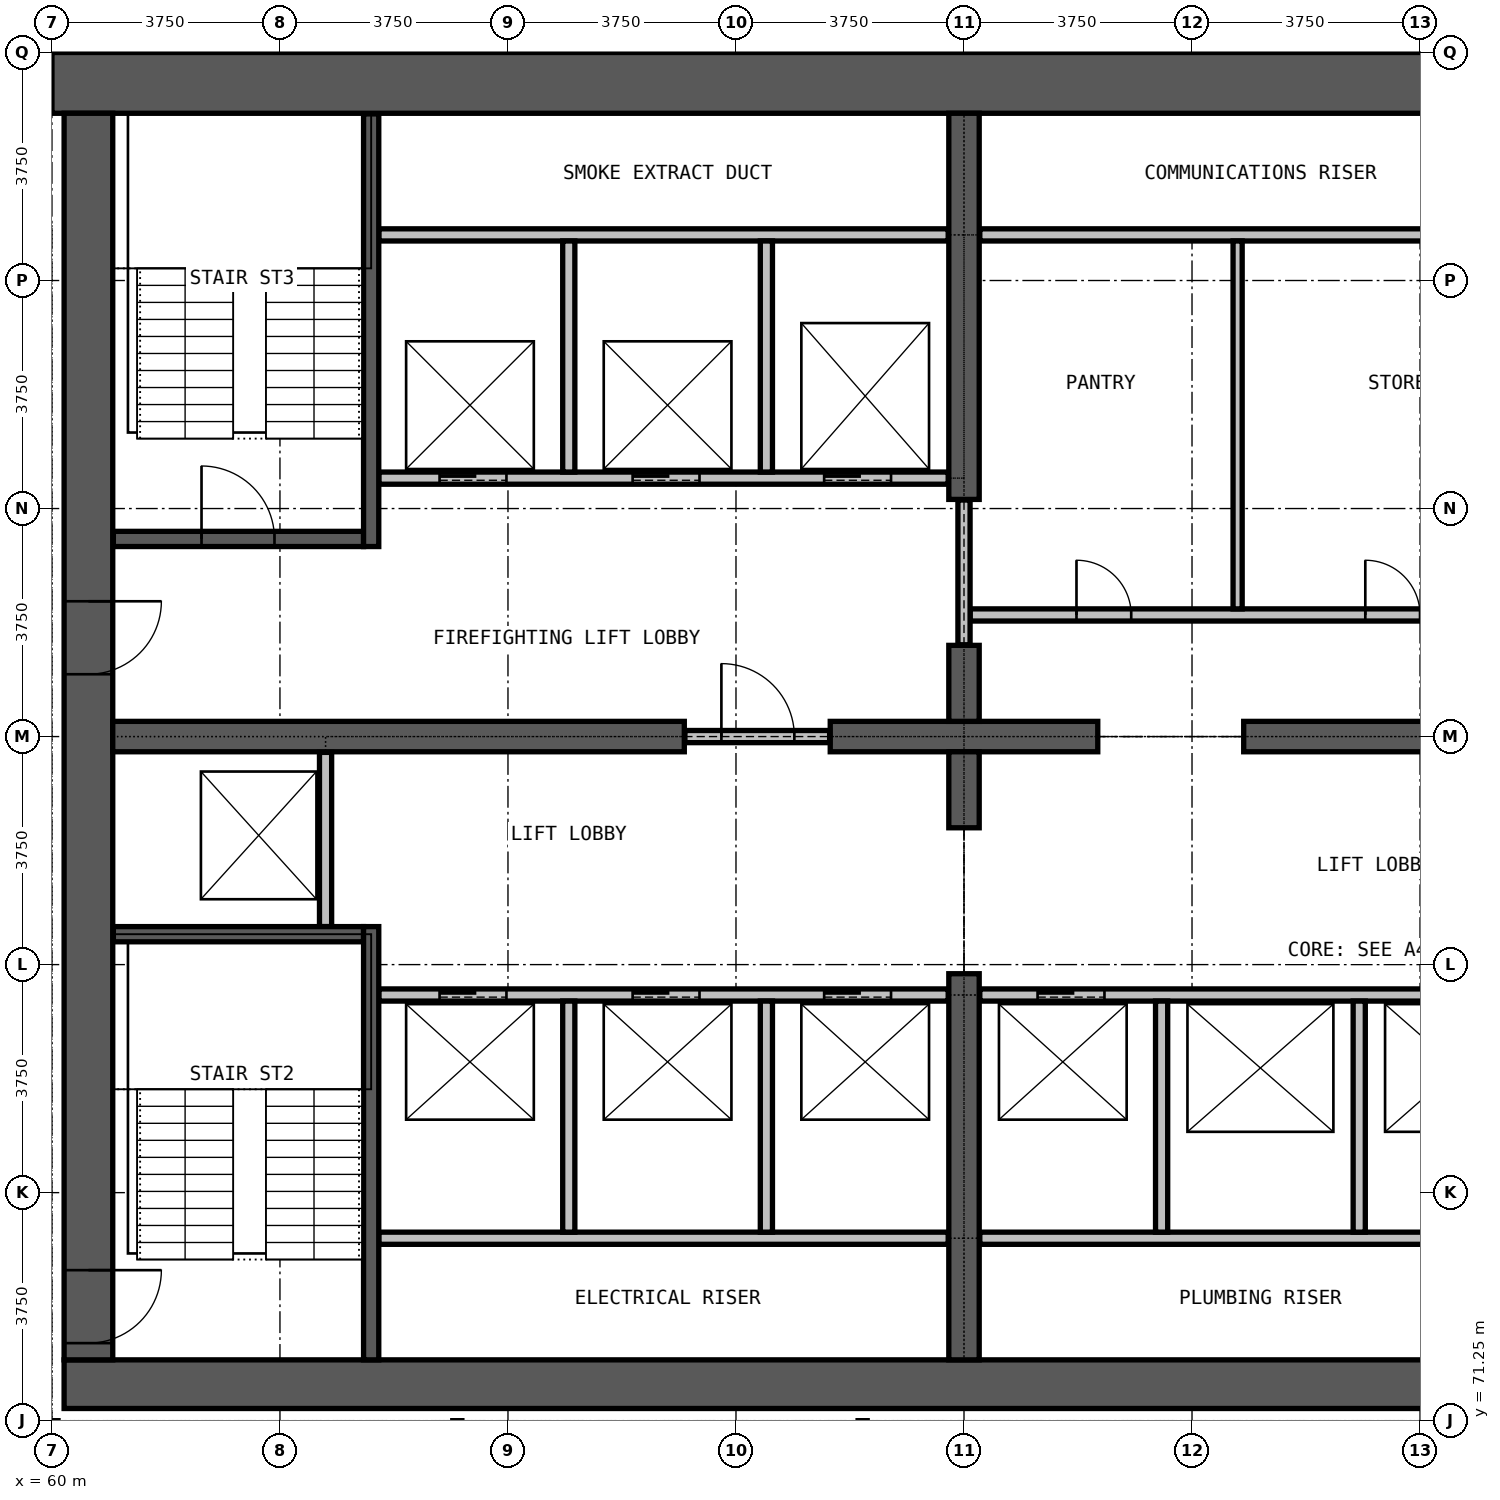
"""IFC4 building model, lengths in metres.
Left out: names, types, materials, properties, quantities, classifications, styles, units other than length and angle.
Written with IfcOpenShell. Run it as: python <this file> out.ifc"""

import sys

from ifc_helpers import new_model, si_unit, direction, frame, frame_2d, origin, place, context, subcontext, project, spatial, rectangle, extrude, element, fill, save


model = new_model("IFC4")
c1 = context("Model", 3, precision=1e-05, world=origin(), true_north=direction((0.0, 1.0)))
c2 = subcontext(c1, "Body", "Model", "MODEL_VIEW")
j1 = project(units=[si_unit("LENGTHUNIT", "METRE"), si_unit("PLANEANGLEUNIT", "RADIAN")], contexts=[c1])
p1 = place(None, origin())
s1 = spatial("IfcSite", under=j1, at=p1, CompositionType="ELEMENT")
p2 = place(p1, origin())
s2 = spatial("IfcBuilding", under=s1, at=p2, CompositionType="ELEMENT")
p3 = place(p2, frame((0.0, 0.0, 121.6)))
s3 = spatial("IfcBuildingStorey", under=s2, at=p3, CompositionType="ELEMENT", Elevation=121.6)
p4 = place(p3, frame((60.2, 71.85, 0.0), z_axis=(0.0, 0.0, 1.0), x_axis=(1.0, 0.0, 0.0)))
e1 = element("IfcWall", 1, at=p4, inside=s3, PredefinedType="SHEAR", context=c2, shape_type="SweptSolid", body=[
    extrude(rectangle(XDim=29.6, YDim=0.8, at=frame_2d((14.8, 0.0))), origin(), (0.0, 0.0, 1.0), 3.6),
])
p5 = place(p3, frame((90.0, 93.25, 0.0), z_axis=(0.0, 0.0, 1.0), x_axis=(-1.0, 0.0, 0.0)))
e2 = element("IfcWall", 2, at=p5, inside=s3, PredefinedType="SHEAR", context=c2, shape_type="SweptSolid", body=[
    extrude(rectangle(XDim=30.0, YDim=1.0, at=frame_2d((15.0, 0.0))), origin(), (0.0, 0.0, 1.0), 3.6),
])
p6 = place(p3, frame((60.6, 92.75, 0.0), z_axis=(0.0, 0.0, 1.0), x_axis=(0.0, -1.0, 0.0)))
e3 = element("IfcWall", 3, at=p6, inside=s3, PredefinedType="SHEAR", context=c2, shape_type="SweptSolid", body=[
    extrude(rectangle(XDim=20.5, YDim=0.8, at=frame_2d((10.25, 0.0))), origin(), (0.0, 0.0, 1.0), 3.6),
])
p7 = place(p6, frame((19.025, 0.0, 0.0)))
e4 = element("IfcOpeningElement", 4, at=p7, cuts=e3, PredefinedType="OPENING", context=c2, shape_type="SweptSolid", body=[
    extrude(rectangle(XDim=1.2, YDim=2.2, at=frame_2d((0.6, 1.1))), frame((0.0, 0.41, 0.0), z_axis=(0.0, -1.0, 0.0), x_axis=(1.0, 0.0, 0.0)), (0.0, 0.0, 1.0), 0.82),
])
p8 = place(p6, frame((8.025, 0.0, 0.0)))
e5 = element("IfcOpeningElement", 5, at=p8, cuts=e3, PredefinedType="OPENING", context=c2, shape_type="SweptSolid", body=[
    extrude(rectangle(XDim=1.2, YDim=2.2, at=frame_2d((0.6, 1.1))), frame((0.0, 0.41, 0.0), z_axis=(0.0, -1.0, 0.0), x_axis=(1.0, 0.0, 0.0)), (0.0, 0.0, 1.0), 0.82),
])
p9 = place(p3, frame((61.0, 82.5, 0.0), z_axis=(0.0, 0.0, 1.0), x_axis=(1.0, 0.0, 0.0)))
e6 = element("IfcWall", 6, at=p9, inside=s3, PredefinedType="SHEAR", context=c2, shape_type="SweptSolid", body=[
    extrude(rectangle(XDim=9.4, YDim=0.5, at=frame_2d((4.7, 0.0))), origin(), (0.0, 0.0, 1.0), 3.6),
])
p10 = place(p3, frame((72.8, 82.5, 0.0), z_axis=(0.0, 0.0, 1.0), x_axis=(1.0, 0.0, 0.0)))
e7 = element("IfcWall", 7, at=p10, inside=s3, PredefinedType="SHEAR", context=c2, shape_type="SweptSolid", body=[
    extrude(rectangle(XDim=4.4, YDim=0.5, at=frame_2d((2.2, 0.0))), origin(), (0.0, 0.0, 1.0), 3.6),
])
p11 = place(p3, frame((79.6, 82.5, 0.0), z_axis=(0.0, 0.0, 1.0), x_axis=(1.0, 0.0, 0.0)))
e8 = element("IfcWall", 8, at=p11, inside=s3, PredefinedType="SHEAR", context=c2, shape_type="SweptSolid", body=[
    extrude(rectangle(XDim=9.4, YDim=0.5, at=frame_2d((4.7, 0.0))), origin(), (0.0, 0.0, 1.0), 3.6),
])
p12 = place(p3, frame((75.0, 72.25, 0.0), z_axis=(0.0, 0.0, 1.0), x_axis=(0.0, 1.0, 0.0)))
e9 = element("IfcWall", 9, at=p12, inside=s3, PredefinedType="SHEAR", context=c2, shape_type="SweptSolid", body=[
    extrude(rectangle(XDim=6.35, YDim=0.5, at=frame_2d((3.175, 0.0))), origin(), (0.0, 0.0, 1.0), 3.6),
])
for number, where, z_axis, x_axis in (
    (10, (75.0, 81.0, 0.0), (0.0, 0.0, 1.0), (0.0, 1.0, 0.0)),
    (11, (75.0, 82.75, 0.0), (0.0, 0.0, 1.0), (0.0, 1.0, 0.0)),
):
    element("IfcWall", number, at=place(p3, frame(where, z_axis=z_axis, x_axis=x_axis)), inside=s3, PredefinedType="SHEAR", context=c2, shape_type="SweptSolid", body=[
        extrude(rectangle(XDim=1.25, YDim=0.5, at=frame_2d((0.625, 0.0))), origin(), (0.0, 0.0, 1.0), 3.6),
    ])
p13 = place(p3, frame((75.0, 86.4, 0.0), z_axis=(0.0, 0.0, 1.0), x_axis=(0.0, 1.0, 0.0)))
e12 = element("IfcWall", 12, at=p13, inside=s3, PredefinedType="SHEAR", context=c2, shape_type="SweptSolid", body=[
    extrude(rectangle(XDim=6.35, YDim=0.5, at=frame_2d((3.175, 0.0))), origin(), (0.0, 0.0, 1.0), 3.6),
])
p14 = place(p3, frame((70.41, 82.5, 0.0), z_axis=(0.0, 0.0, 1.0), x_axis=(1.0, 0.0, 0.0)))
e13 = element("IfcWall", 13, at=p14, inside=s3, PredefinedType="PARTITIONING", context=c2, shape_type="SweptSolid", body=[
    extrude(rectangle(XDim=2.38, YDim=0.2, at=frame_2d((1.19, 0.0))), origin(), (0.0, 0.0, 1.0), 2.4),
])
p15 = place(p14, frame((0.6, 0.0, 0.0)))
e14 = element("IfcOpeningElement", 14, at=p15, cuts=e13, PredefinedType="OPENING", context=c2, shape_type="SweptSolid", body=[
    extrude(rectangle(XDim=1.2, YDim=2.2, at=frame_2d((0.6, 1.1))), frame((0.0, 0.11, 0.0), z_axis=(0.0, -1.0, 0.0), x_axis=(1.0, 0.0, 0.0)), (0.0, 0.0, 1.0), 0.22),
])
p16 = place(p3, frame((75.1, 84.5, 0.0), z_axis=(0.0, 0.0, 1.0), x_axis=(1.0, 0.0, 0.0)))
e15 = element("IfcWall", 15, at=p16, inside=s3, PredefinedType="PARTITIONING", context=c2, shape_type="SweptSolid", body=[
    extrude(rectangle(XDim=9.55, YDim=0.2, at=frame_2d((4.775, 0.0))), origin(), (0.0, 0.0, 1.0), 3.3),
])
p17 = place(p16, frame((1.75, 0.0, 0.0)))
e16 = element("IfcOpeningElement", 16, at=p17, cuts=e15, PredefinedType="OPENING", context=c2, shape_type="SweptSolid", body=[
    extrude(rectangle(XDim=0.9, YDim=2.2, at=frame_2d((0.45, 1.1))), frame((0.0, 0.11, 0.0), z_axis=(0.0, -1.0, 0.0), x_axis=(1.0, 0.0, 0.0)), (0.0, 0.0, 1.0), 0.22),
])
p18 = place(p16, frame((6.5, 0.0, 0.0)))
e17 = element("IfcOpeningElement", 17, at=p18, cuts=e15, PredefinedType="OPENING", context=c2, shape_type="SweptSolid", body=[
    extrude(rectangle(XDim=0.9, YDim=2.2, at=frame_2d((0.45, 1.1))), frame((0.0, 0.11, 0.0), z_axis=(0.0, -1.0, 0.0), x_axis=(1.0, 0.0, 0.0)), (0.0, 0.0, 1.0), 0.22),
])
p19 = place(p3, frame((75.26, 90.75, 0.0), z_axis=(0.0, 0.0, 1.0), x_axis=(1.0, 0.0, 0.0)))
e18 = element("IfcWall", 18, at=p19, inside=s3, PredefinedType="PARTITIONING", context=c2, shape_type="SweptSolid", body=[
    extrude(rectangle(XDim=9.365, YDim=0.2, at=frame_2d((4.683, 0.0))), origin(), (0.0, 0.0, 1.0), 3.3),
])
p20 = place(p3, frame((75.0, 84.01, 0.0), z_axis=(0.0, 0.0, 1.0), x_axis=(0.0, 1.0, 0.0)))
e19 = element("IfcWall", 19, at=p20, inside=s3, PredefinedType="PARTITIONING", context=c2, shape_type="SweptSolid", body=[
    extrude(rectangle(XDim=2.38, YDim=0.2, at=frame_2d((1.19, 0.0))), origin(), (0.0, 0.0, 1.0), 2.4),
])
p21 = place(p3, frame((79.5, 84.6, 0.0), z_axis=(0.0, 0.0, 1.0), x_axis=(0.0, 1.0, 0.0)))
e20 = element("IfcWall", 20, at=p21, inside=s3, PredefinedType="PARTITIONING", context=c2, shape_type="SweptSolid", body=[
    extrude(rectangle(XDim=6.05, YDim=0.15, at=frame_2d((3.025, 0.0))), origin(), (0.0, 0.0, 1.0), 3.3),
])
for number, where, z_axis, x_axis in (
    (21, (65.375, 74.25, 0.0), (0.0, 0.0, 1.0), (1.0, 0.0, 0.0)),
    (22, (75.26, 74.25, 0.0), (0.0, 0.0, 1.0), (1.0, 0.0, 0.0)),
):
    element("IfcWall", number, at=place(p3, frame(where, z_axis=z_axis, x_axis=x_axis)), inside=s3, PredefinedType="PARTITIONING", context=c2, shape_type="SweptSolid", body=[
        extrude(rectangle(XDim=9.365, YDim=0.2, at=frame_2d((4.683, 0.0))), origin(), (0.0, 0.0, 1.0), 3.3),
    ])
p22 = place(p3, frame((65.375, 78.25, 0.0), z_axis=(0.0, 0.0, 1.0), x_axis=(1.0, 0.0, 0.0)))
e23 = element("IfcWall", 23, at=p22, inside=s3, PredefinedType="PARTITIONING", context=c2, shape_type="SweptSolid", body=[
    extrude(rectangle(XDim=9.365, YDim=0.2, at=frame_2d((4.683, 0.0))), origin(), (0.0, 0.0, 1.0), 3.3),
])
p23 = place(p22, frame((1.0, 0.0, 0.0)))
e24 = element("IfcOpeningElement", 24, at=p23, cuts=e23, PredefinedType="OPENING", context=c2, shape_type="SweptSolid", body=[
    extrude(rectangle(XDim=1.1, YDim=2.2, at=frame_2d((0.55, 1.1))), frame((0.0, 0.11, 0.0), z_axis=(0.0, -1.0, 0.0), x_axis=(1.0, 0.0, 0.0)), (0.0, 0.0, 1.0), 0.22),
])
p24 = place(p22, frame((4.175, 0.0, 0.0)))
e25 = element("IfcOpeningElement", 25, at=p24, cuts=e23, PredefinedType="OPENING", context=c2, shape_type="SweptSolid", body=[
    extrude(rectangle(XDim=1.1, YDim=2.2, at=frame_2d((0.55, 1.1))), frame((0.0, 0.11, 0.0), z_axis=(0.0, -1.0, 0.0), x_axis=(1.0, 0.0, 0.0)), (0.0, 0.0, 1.0), 0.22),
])
p25 = place(p22, frame((7.325, 0.0, 0.0)))
e26 = element("IfcOpeningElement", 26, at=p25, cuts=e23, PredefinedType="OPENING", context=c2, shape_type="SweptSolid", body=[
    extrude(rectangle(XDim=1.1, YDim=2.2, at=frame_2d((0.55, 1.1))), frame((0.0, 0.11, 0.0), z_axis=(0.0, -1.0, 0.0), x_axis=(1.0, 0.0, 0.0)), (0.0, 0.0, 1.0), 0.22),
])
p26 = place(p3, frame((75.26, 78.25, 0.0), z_axis=(0.0, 0.0, 1.0), x_axis=(1.0, 0.0, 0.0)))
e27 = element("IfcWall", 27, at=p26, inside=s3, PredefinedType="PARTITIONING", context=c2, shape_type="SweptSolid", body=[
    extrude(rectangle(XDim=9.365, YDim=0.2, at=frame_2d((4.683, 0.0))), origin(), (0.0, 0.0, 1.0), 3.3),
])
p27 = place(p26, frame((0.95, 0.0, 0.0)))
e28 = element("IfcOpeningElement", 28, at=p27, cuts=e27, PredefinedType="OPENING", context=c2, shape_type="SweptSolid", body=[
    extrude(rectangle(XDim=1.1, YDim=2.2, at=frame_2d((0.55, 1.1))), frame((0.0, 0.11, 0.0), z_axis=(0.0, -1.0, 0.0), x_axis=(1.0, 0.0, 0.0)), (0.0, 0.0, 1.0), 0.22),
])
p28 = place(p3, frame((65.375, 86.75, 0.0), z_axis=(0.0, 0.0, 1.0), x_axis=(1.0, 0.0, 0.0)))
e29 = element("IfcWall", 29, at=p28, inside=s3, PredefinedType="PARTITIONING", context=c2, shape_type="SweptSolid", body=[
    extrude(rectangle(XDim=9.365, YDim=0.2, at=frame_2d((4.683, 0.0))), origin(), (0.0, 0.0, 1.0), 3.3),
])
p29 = place(p28, frame((1.0, 0.0, 0.0)))
e30 = element("IfcOpeningElement", 30, at=p29, cuts=e29, PredefinedType="OPENING", context=c2, shape_type="SweptSolid", body=[
    extrude(rectangle(XDim=1.1, YDim=2.2, at=frame_2d((0.55, 1.1))), frame((0.0, 0.11, 0.0), z_axis=(0.0, -1.0, 0.0), x_axis=(1.0, 0.0, 0.0)), (0.0, 0.0, 1.0), 0.22),
])
p30 = place(p28, frame((4.175, 0.0, 0.0)))
e31 = element("IfcOpeningElement", 31, at=p30, cuts=e29, PredefinedType="OPENING", context=c2, shape_type="SweptSolid", body=[
    extrude(rectangle(XDim=1.1, YDim=2.2, at=frame_2d((0.55, 1.1))), frame((0.0, 0.11, 0.0), z_axis=(0.0, -1.0, 0.0), x_axis=(1.0, 0.0, 0.0)), (0.0, 0.0, 1.0), 0.22),
])
p31 = place(p28, frame((7.325, 0.0, 0.0)))
e32 = element("IfcOpeningElement", 32, at=p31, cuts=e29, PredefinedType="OPENING", context=c2, shape_type="SweptSolid", body=[
    extrude(rectangle(XDim=1.1, YDim=2.2, at=frame_2d((0.55, 1.1))), frame((0.0, 0.11, 0.0), z_axis=(0.0, -1.0, 0.0), x_axis=(1.0, 0.0, 0.0)), (0.0, 0.0, 1.0), 0.22),
])
p32 = place(p3, frame((65.375, 90.75, 0.0), z_axis=(0.0, 0.0, 1.0), x_axis=(1.0, 0.0, 0.0)))
e33 = element("IfcWall", 33, at=p32, inside=s3, PredefinedType="PARTITIONING", context=c2, shape_type="SweptSolid", body=[
    extrude(rectangle(XDim=9.365, YDim=0.2, at=frame_2d((4.683, 0.0))), origin(), (0.0, 0.0, 1.0), 3.3),
])
p33 = place(p3, frame((64.5, 79.375, 0.0), z_axis=(0.0, 0.0, 1.0), x_axis=(0.0, 1.0, 0.0)))
e34 = element("IfcWall", 34, at=p33, inside=s3, PredefinedType="PARTITIONING", context=c2, shape_type="SweptSolid", body=[
    extrude(rectangle(XDim=2.865, YDim=0.2, at=frame_2d((1.433, 0.0))), origin(), (0.0, 0.0, 1.0), 3.3),
])
for number, where, z_axis, x_axis in (
    (35, (68.5, 74.35, 0.0), (0.0, 0.0, 1.0), (0.0, 1.0, 0.0)),
    (36, (68.5, 86.85, 0.0), (0.0, 0.0, 1.0), (0.0, 1.0, 0.0)),
    (37, (71.75, 74.35, 0.0), (0.0, 0.0, 1.0), (0.0, 1.0, 0.0)),
    (38, (71.75, 86.85, 0.0), (0.0, 0.0, 1.0), (0.0, 1.0, 0.0)),
    (39, (78.25, 74.35, 0.0), (0.0, 0.0, 1.0), (0.0, 1.0, 0.0)),
    (40, (81.5, 74.35, 0.0), (0.0, 0.0, 1.0), (0.0, 1.0, 0.0)),
):
    element("IfcWall", number, at=place(p3, frame(where, z_axis=z_axis, x_axis=x_axis)), inside=s3, PredefinedType="PARTITIONING", context=c2, shape_type="SweptSolid", body=[
        extrude(rectangle(XDim=3.8, YDim=0.2, at=frame_2d((1.9, 0.0))), origin(), (0.0, 0.0, 1.0), 3.3),
    ])
p34 = place(p3, frame((61.01, 79.25, 0.0), z_axis=(0.0, 0.0, 1.0), x_axis=(1.0, 0.0, 0.0)))
e41 = element("IfcWall", 41, at=p34, inside=s3, PredefinedType="PARTITIONING", context=c2, shape_type="SweptSolid", body=[
    extrude(rectangle(XDim=4.115, YDim=0.25, at=frame_2d((2.058, 0.0))), origin(), (0.0, 0.0, 1.0), 3.3),
])
p35 = place(p3, frame((61.01, 85.75, 0.0), z_axis=(0.0, 0.0, 1.0), x_axis=(1.0, 0.0, 0.0)))
e42 = element("IfcWall", 42, at=p35, inside=s3, PredefinedType="PARTITIONING", context=c2, shape_type="SweptSolid", body=[
    extrude(rectangle(XDim=4.115, YDim=0.25, at=frame_2d((2.058, 0.0))), origin(), (0.0, 0.0, 1.0), 3.3),
])
p36 = place(p35, frame((1.45, 0.0, 0.0)))
e43 = element("IfcOpeningElement", 43, at=p36, cuts=e42, PredefinedType="OPENING", context=c2, shape_type="SweptSolid", body=[
    extrude(rectangle(XDim=1.2, YDim=2.2, at=frame_2d((0.6, 1.1))), frame((0.0, 0.135, 0.0), z_axis=(0.0, -1.0, 0.0), x_axis=(1.0, 0.0, 0.0)), (0.0, 0.0, 1.0), 0.27),
])
p37 = place(p3, frame((65.25, 72.25, 0.0), z_axis=(0.0, 0.0, 1.0), x_axis=(0.0, 1.0, 0.0)))
e44 = element("IfcWall", 44, at=p37, inside=s3, PredefinedType="PARTITIONING", context=c2, shape_type="SweptSolid", body=[
    extrude(rectangle(XDim=7.125, YDim=0.25, at=frame_2d((3.562, 0.0))), origin(), (0.0, 0.0, 1.0), 3.3),
])
p38 = place(p3, frame((65.25, 85.625, 0.0), z_axis=(0.0, 0.0, 1.0), x_axis=(0.0, 1.0, 0.0)))
e45 = element("IfcWall", 45, at=p38, inside=s3, PredefinedType="PARTITIONING", context=c2, shape_type="SweptSolid", body=[
    extrude(rectangle(XDim=7.115, YDim=0.25, at=frame_2d((3.558, 0.0))), origin(), (0.0, 0.0, 1.0), 3.3),
])
p39 = place(p23, origin())
e46 = element("IfcDoor", 46, at=p39, inside=s3, OperationType="DOUBLE_DOOR_SLIDING", PredefinedType="DOOR", context=c2, shape_type="SweptSolid", body=[
    extrude(rectangle(XDim=1.1, YDim=2.2, at=frame_2d((0.55, 1.1))), frame((0.0, 0.025, 0.0), z_axis=(0.0, -1.0, 0.0), x_axis=(1.0, 0.0, 0.0)), (0.0, 0.0, 1.0), 0.05),
])
fill(e24, e46)
p40 = place(p24, origin())
e47 = element("IfcDoor", 47, at=p40, inside=s3, OperationType="DOUBLE_DOOR_SLIDING", PredefinedType="DOOR", context=c2, shape_type="SweptSolid", body=[
    extrude(rectangle(XDim=1.1, YDim=2.2, at=frame_2d((0.55, 1.1))), frame((0.0, 0.025, 0.0), z_axis=(0.0, -1.0, 0.0), x_axis=(1.0, 0.0, 0.0)), (0.0, 0.0, 1.0), 0.05),
])
fill(e25, e47)
p41 = place(p25, origin())
e48 = element("IfcDoor", 48, at=p41, inside=s3, OperationType="DOUBLE_DOOR_SLIDING", PredefinedType="DOOR", context=c2, shape_type="SweptSolid", body=[
    extrude(rectangle(XDim=1.1, YDim=2.2, at=frame_2d((0.55, 1.1))), frame((0.0, 0.025, 0.0), z_axis=(0.0, -1.0, 0.0), x_axis=(1.0, 0.0, 0.0)), (0.0, 0.0, 1.0), 0.05),
])
fill(e26, e48)
p42 = place(p27, origin())
e49 = element("IfcDoor", 49, at=p42, inside=s3, OperationType="DOUBLE_DOOR_SLIDING", PredefinedType="DOOR", context=c2, shape_type="SweptSolid", body=[
    extrude(rectangle(XDim=1.1, YDim=2.2, at=frame_2d((0.55, 1.1))), frame((0.0, 0.025, 0.0), z_axis=(0.0, -1.0, 0.0), x_axis=(1.0, 0.0, 0.0)), (0.0, 0.0, 1.0), 0.05),
])
fill(e28, e49)
p43 = place(p29, origin())
e50 = element("IfcDoor", 50, at=p43, inside=s3, OperationType="DOUBLE_DOOR_SLIDING", PredefinedType="DOOR", context=c2, shape_type="SweptSolid", body=[
    extrude(rectangle(XDim=1.1, YDim=2.2, at=frame_2d((0.55, 1.1))), frame((0.0, 0.025, 0.0), z_axis=(0.0, -1.0, 0.0), x_axis=(1.0, 0.0, 0.0)), (0.0, 0.0, 1.0), 0.05),
])
fill(e30, e50)
p44 = place(p30, origin())
e51 = element("IfcDoor", 51, at=p44, inside=s3, OperationType="DOUBLE_DOOR_SLIDING", PredefinedType="DOOR", context=c2, shape_type="SweptSolid", body=[
    extrude(rectangle(XDim=1.1, YDim=2.2, at=frame_2d((0.55, 1.1))), frame((0.0, 0.025, 0.0), z_axis=(0.0, -1.0, 0.0), x_axis=(1.0, 0.0, 0.0)), (0.0, 0.0, 1.0), 0.05),
])
fill(e31, e51)
p45 = place(p31, origin())
e52 = element("IfcDoor", 52, at=p45, inside=s3, OperationType="DOUBLE_DOOR_SLIDING", PredefinedType="DOOR", context=c2, shape_type="SweptSolid", body=[
    extrude(rectangle(XDim=1.1, YDim=2.2, at=frame_2d((0.55, 1.1))), frame((0.0, 0.025, 0.0), z_axis=(0.0, -1.0, 0.0), x_axis=(1.0, 0.0, 0.0)), (0.0, 0.0, 1.0), 0.05),
])
fill(e32, e52)
p46 = place(p15, origin())
e53 = element("IfcDoor", 53, at=p46, inside=s3, OperationType="SINGLE_SWING_LEFT", PredefinedType="DOOR", context=c2, shape_type="SweptSolid", body=[
    extrude(rectangle(XDim=1.2, YDim=2.2, at=frame_2d((0.6, 1.1))), frame((0.0, 0.025, 0.0), z_axis=(0.0, -1.0, 0.0), x_axis=(1.0, 0.0, 0.0)), (0.0, 0.0, 1.0), 0.05),
])
fill(e14, e53)
p47 = place(p36, origin())
e54 = element("IfcDoor", 54, at=p47, inside=s3, OperationType="SINGLE_SWING_LEFT", PredefinedType="DOOR", context=c2, shape_type="SweptSolid", body=[
    extrude(rectangle(XDim=1.2, YDim=2.2, at=frame_2d((0.6, 1.1))), frame((0.0, 0.025, 0.0), z_axis=(0.0, -1.0, 0.0), x_axis=(1.0, 0.0, 0.0)), (0.0, 0.0, 1.0), 0.05),
])
fill(e43, e54)
p48 = place(p7, origin())
e55 = element("IfcDoor", 55, at=p48, inside=s3, OperationType="SINGLE_SWING_RIGHT", PredefinedType="DOOR", context=c2, shape_type="SweptSolid", body=[
    extrude(rectangle(XDim=1.2, YDim=2.2, at=frame_2d((0.6, 1.1))), frame((0.0, 0.025, 0.0), z_axis=(0.0, -1.0, 0.0), x_axis=(1.0, 0.0, 0.0)), (0.0, 0.0, 1.0), 0.05),
])
fill(e4, e55)
p49 = place(p8, origin())
e56 = element("IfcDoor", 56, at=p49, inside=s3, OperationType="SINGLE_SWING_RIGHT", PredefinedType="DOOR", context=c2, shape_type="SweptSolid", body=[
    extrude(rectangle(XDim=1.2, YDim=2.2, at=frame_2d((0.6, 1.1))), frame((0.0, 0.025, 0.0), z_axis=(0.0, -1.0, 0.0), x_axis=(1.0, 0.0, 0.0)), (0.0, 0.0, 1.0), 0.05),
])
fill(e5, e56)
p50 = place(p17, origin())
e57 = element("IfcDoor", 57, at=p50, inside=s3, OperationType="SINGLE_SWING_RIGHT", PredefinedType="DOOR", context=c2, shape_type="SweptSolid", body=[
    extrude(rectangle(XDim=0.9, YDim=2.2, at=frame_2d((0.45, 1.1))), frame((0.0, 0.025, 0.0), z_axis=(0.0, -1.0, 0.0), x_axis=(1.0, 0.0, 0.0)), (0.0, 0.0, 1.0), 0.05),
])
fill(e16, e57)
p51 = place(p18, origin())
e58 = element("IfcDoor", 58, at=p51, inside=s3, OperationType="SINGLE_SWING_RIGHT", PredefinedType="DOOR", context=c2, shape_type="SweptSolid", body=[
    extrude(rectangle(XDim=0.9, YDim=2.2, at=frame_2d((0.45, 1.1))), frame((0.0, 0.025, 0.0), z_axis=(0.0, -1.0, 0.0), x_axis=(1.0, 0.0, 0.0)), (0.0, 0.0, 1.0), 0.05),
])
fill(e17, e58)
save(model, sys.argv[1])
